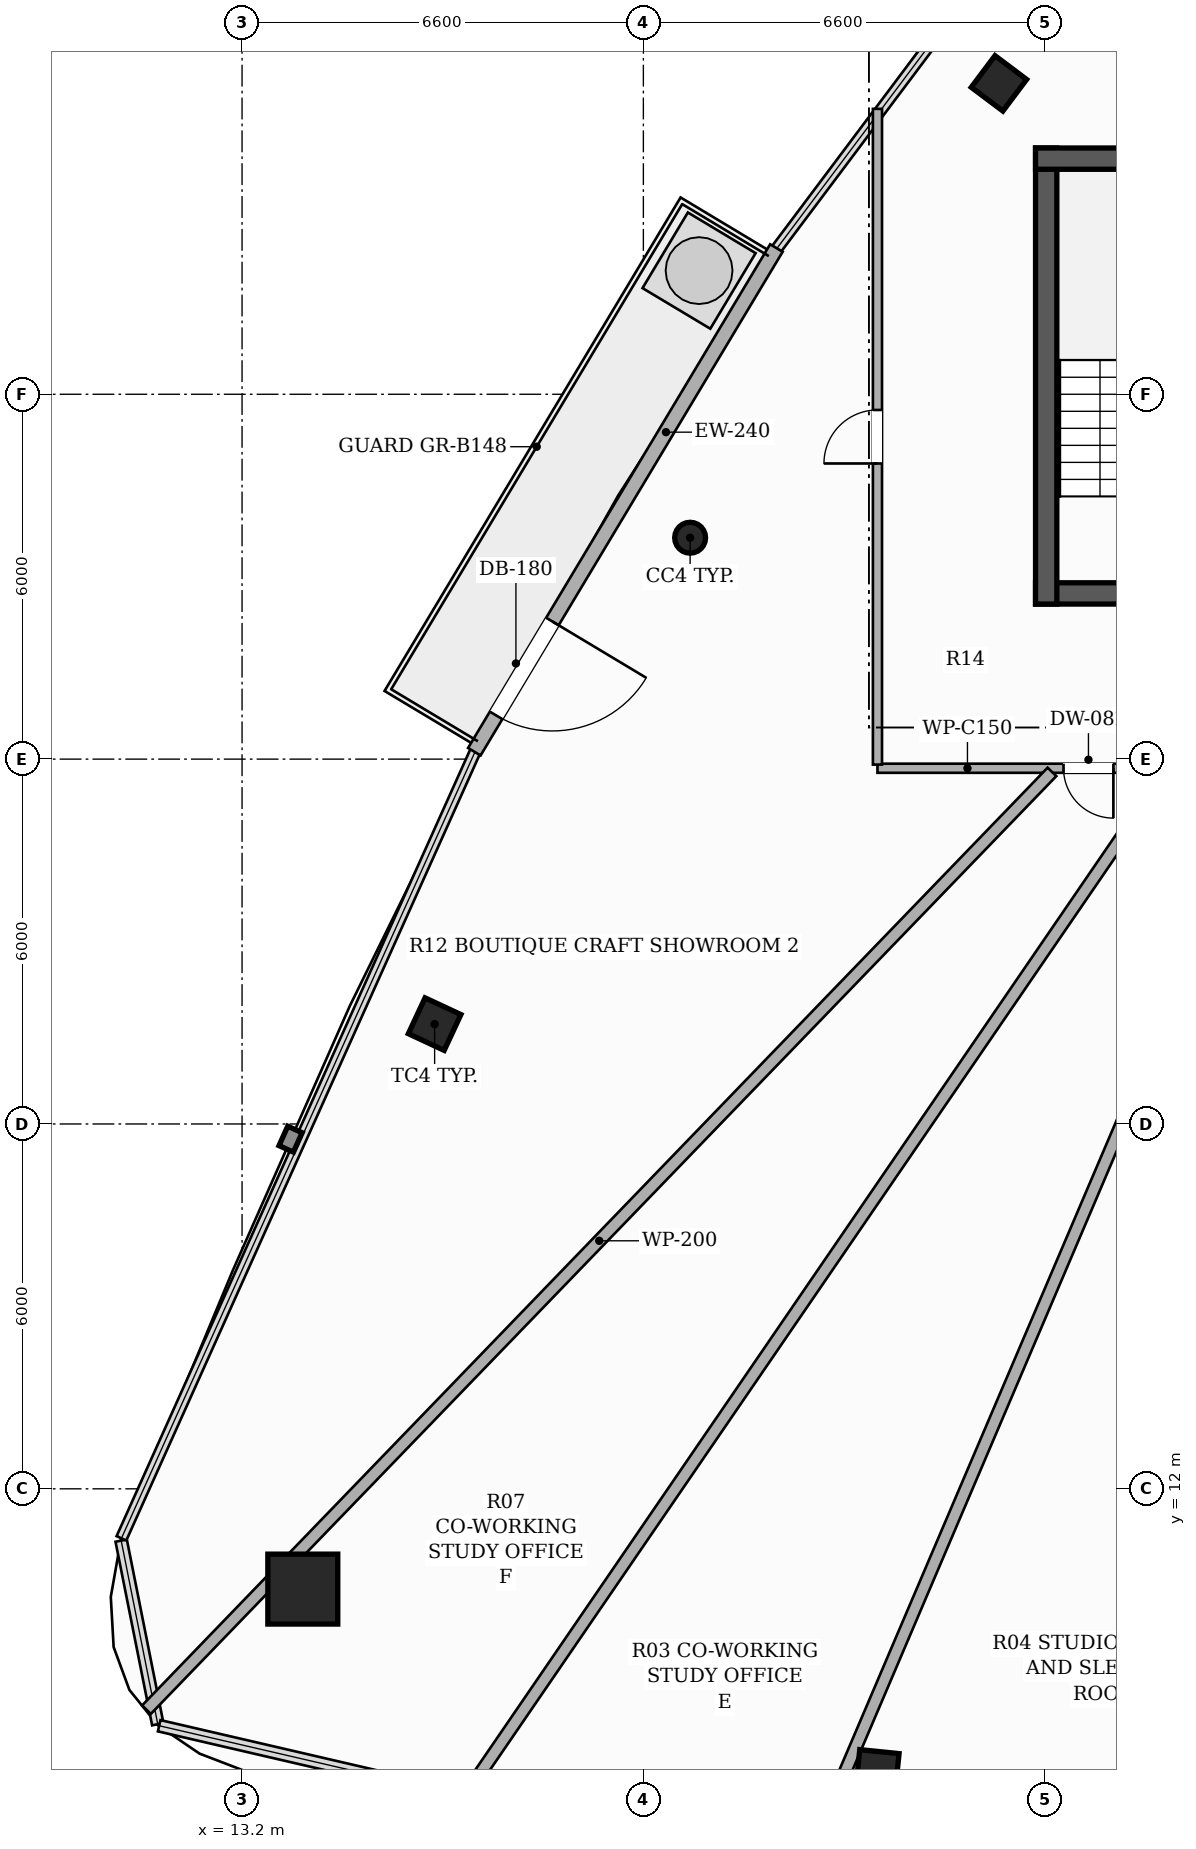
"""IFC4 building model, lengths in metres.
Left out: names, types, materials, properties, quantities, classifications, styles, units other than length and angle.
Written with IfcOpenShell. Run it as: python <this file> out.ifc"""

import sys

from ifc_helpers import new_model, si_unit, direction, frame, frame_2d, origin, origin_2d, place, context, subcontext, project, spatial, rectangle, hollow_rectangle, hollow_circle, extrude, element, fill, save


model = new_model("IFC4")
c1 = context("Model", 3, precision=1e-05, world=origin(), true_north=direction((0.0, 1.0)))
c2 = subcontext(c1, "Body", "Model", "MODEL_VIEW")
j1 = project(units=[si_unit("LENGTHUNIT", "METRE"), si_unit("PLANEANGLEUNIT", "RADIAN")], contexts=[c1])
p1 = place(None, origin())
s1 = spatial("IfcSite", under=j1, at=p1, CompositionType="ELEMENT")
p2 = place(p1, origin())
s2 = spatial("IfcBuilding", under=s1, at=p2, CompositionType="ELEMENT")
p3 = place(p2, frame((0.0, 0.0, 263.45)))
s3 = spatial("IfcBuildingStorey", under=s2, at=p3, CompositionType="ELEMENT", Elevation=263.45)
p4 = place(p3, frame((26.25, 26.725, 0.0), z_axis=(0.0, 0.0, 1.0), x_axis=(1.0, 0.0, 0.0)))
e1 = element("IfcWall", 1, at=p4, inside=s3, PredefinedType="SHEAR", context=c2, shape_type="SweptSolid", body=[
    extrude(rectangle(XDim=13.5, YDim=0.35, at=frame_2d((6.75, 0.0))), origin(), (0.0, 0.0, 1.0), 3.3),
])
p5 = place(p4, frame((4.35, 0.0, 0.0)))
e2 = element("IfcOpeningElement", 2, at=p5, cuts=e1, PredefinedType="OPENING", context=c2, shape_type="SweptSolid", body=[
    extrude(rectangle(XDim=1.05, YDim=2.15, at=frame_2d((0.525, 1.075))), frame((0.0, 0.185, 0.0), z_axis=(0.0, -1.0, 0.0), x_axis=(1.0, 0.0, 0.0)), (0.0, 0.0, 1.0), 0.37),
])
p6 = place(p4, frame((8.3, 0.0, 0.0)))
e3 = element("IfcOpeningElement", 3, at=p6, cuts=e1, PredefinedType="OPENING", context=c2, shape_type="SweptSolid", body=[
    extrude(rectangle(XDim=1.05, YDim=2.15, at=frame_2d((0.525, 1.075))), frame((0.0, 0.185, 0.0), z_axis=(0.0, -1.0, 0.0), x_axis=(1.0, 0.0, 0.0)), (0.0, 0.0, 1.0), 0.37),
])
p7 = place(p3, frame((26.425, 26.55, 0.0), z_axis=(0.0, 0.0, 1.0), x_axis=(0.0, 1.0, 0.0)))
e4 = element("IfcWall", 4, at=p7, inside=s3, PredefinedType="SHEAR", context=c2, shape_type="SweptSolid", body=[
    extrude(rectangle(XDim=7.5, YDim=0.35, at=frame_2d((3.75, 0.0))), origin(), (0.0, 0.0, 1.0), 3.3),
])
p8 = place(p3, frame((26.25, 33.875, 0.0), z_axis=(0.0, 0.0, 1.0), x_axis=(1.0, 0.0, 0.0)))
e5 = element("IfcWall", 5, at=p8, inside=s3, PredefinedType="SHEAR", context=c2, shape_type="SweptSolid", body=[
    extrude(rectangle(XDim=3.6, YDim=0.35, at=frame_2d((1.8, 0.0))), origin(), (0.0, 0.0, 1.0), 3.3),
])
p9 = place(p3, frame((14.199, 10.351, 0.0), z_axis=(0.0, 0.0, 1.0), x_axis=(1.0, 0.0, 0.0)))
e6 = element("IfcColumn", 6, at=p9, inside=s3, PredefinedType="COLUMN", context=c2, shape_type="SweptSolid", body=[
    extrude(hollow_rectangle(XDim=1.15, YDim=1.15, WallThickness=0.036, at=origin_2d()), origin(), (0.0, 0.0, 1.0), 3.3),
])
p10 = place(p3, frame((25.648, 35.113, 0.0), z_axis=(0.0, 0.0, 1.0), x_axis=(0.600420225326, 0.799684658487, 0.0)))
e7 = element("IfcColumn", 7, at=p10, inside=s3, PredefinedType="COLUMN", context=c2, shape_type="SweptSolid", body=[
    extrude(hollow_rectangle(XDim=0.65, YDim=0.65, WallThickness=0.022, at=origin_2d()), origin(), (0.0, 0.0, 1.0), 3.3),
])
p11 = place(p3, frame((20.569, 27.641, 0.0), z_axis=(0.0, 0.0, 1.0), x_axis=(1.0, 0.0, 0.0)))
e8 = element("IfcColumn", 8, at=p11, inside=s3, PredefinedType="COLUMN", context=c2, shape_type="SweptSolid", body=[
    extrude(hollow_circle(Radius=0.254, WallThickness=0.016, at=origin_2d()), origin(), (0.0, 0.0, 1.0), 3.3),
])
for number, where, z_axis, x_axis in (
    (9, (16.367, 19.642, 0.0), (0.0, 0.0, 1.0), (0.423, 0.906, 0.0)),
    (10, (23.649, 7.355, 0.0), (0.0, 0.0, 1.0), (-0.995, 0.101, 0.0)),
):
    element("IfcColumn", number, at=place(p3, frame(where, z_axis=z_axis, x_axis=x_axis)), inside=s3, PredefinedType="COLUMN", context=c2, shape_type="SweptSolid", body=[
        extrude(hollow_rectangle(XDim=0.65, YDim=0.65, WallThickness=0.022, at=origin_2d()), origin(), (0.0, 0.0, 1.0), 3.3),
    ])
p12 = place(p3, frame((21.988, 32.405, 0.0), z_axis=(0.0, 0.0, 1.0), x_axis=(-0.514361929684, -0.857573206958, 0.0)))
e11 = element("IfcWall", 11, at=p12, inside=s3, PredefinedType="SOLIDWALL", context=c2, shape_type="SweptSolid", body=[
    extrude(rectangle(XDim=9.659, YDim=0.24, at=frame_2d((4.829, 0.0))), origin(), (0.0, 0.0, 1.0), 2.624),
])
p13 = place(p12, frame((7.162, 0.0, 0.0)))
e12 = element("IfcOpeningElement", 12, at=p13, cuts=e11, PredefinedType="OPENING", context=c2, shape_type="SweptSolid", body=[
    extrude(rectangle(XDim=1.8, YDim=2.2, at=frame_2d((0.9, 1.1))), frame((0.0, 0.13, 0.0), z_axis=(0.0, -1.0, 0.0), x_axis=(1.0, 0.0, 0.0)), (0.0, 0.0, 1.0), 0.26),
])
p14 = place(p3, frame((32.168, 23.85, 0.0), z_axis=(0.0, 0.0, 1.0), x_axis=(-1.0, 0.0, 0.0)))
e13 = element("IfcWall", 13, at=p14, inside=s3, PredefinedType="PARTITIONING", context=c2, shape_type="SweptSolid", body=[
    extrude(rectangle(XDim=8.518, YDim=0.15, at=frame_2d((4.259, 0.0))), origin(), (0.0, 0.0, 1.0), 2.565),
])
p15 = place(p14, frame((0.894, 0.0, 0.0)))
e14 = element("IfcOpeningElement", 14, at=p15, cuts=e13, PredefinedType="OPENING", context=c2, shape_type="SweptSolid", body=[
    extrude(rectangle(XDim=0.92, YDim=2.15, at=frame_2d((0.46, 1.075))), frame((0.0, 0.085, 0.0), z_axis=(0.0, -1.0, 0.0), x_axis=(1.0, 0.0, 0.0)), (0.0, 0.0, 1.0), 0.17),
])
p16 = place(p14, frame((2.683, 0.0, 0.0)))
e15 = element("IfcOpeningElement", 15, at=p16, cuts=e13, PredefinedType="OPENING", context=c2, shape_type="SweptSolid", body=[
    extrude(rectangle(XDim=0.88, YDim=2.1, at=frame_2d((0.44, 1.05))), frame((0.0, 0.085, 0.0), z_axis=(0.0, -1.0, 0.0), x_axis=(1.0, 0.0, 0.0)), (0.0, 0.0, 1.0), 0.17),
])
p17 = place(p14, frame((4.638, 0.0, 0.0)))
e16 = element("IfcOpeningElement", 16, at=p17, cuts=e13, PredefinedType="OPENING", context=c2, shape_type="SweptSolid", body=[
    extrude(rectangle(XDim=0.82, YDim=2.1, at=frame_2d((0.41, 1.05))), frame((0.0, 0.085, 0.0), z_axis=(0.0, -1.0, 0.0), x_axis=(1.0, 0.0, 0.0)), (0.0, 0.0, 1.0), 0.17),
])
p18 = place(p3, frame((23.65, 23.91, 0.0), z_axis=(0.0, 0.0, 1.0), x_axis=(0.0, 1.0, 0.0)))
e17 = element("IfcWall", 17, at=p18, inside=s3, PredefinedType="PARTITIONING", context=c2, shape_type="SweptSolid", body=[
    extrude(rectangle(XDim=10.784, YDim=0.15, at=frame_2d((5.392, 0.0))), origin(), (0.0, 0.0, 1.0), 2.492),
])
p19 = place(p18, frame((4.952, 0.0, 0.0)))
e18 = element("IfcOpeningElement", 18, at=p19, cuts=e17, PredefinedType="OPENING", context=c2, shape_type="SweptSolid", body=[
    extrude(rectangle(XDim=0.88, YDim=2.1, at=frame_2d((0.44, 1.05))), frame((0.0, 0.085, 0.0), z_axis=(0.0, -1.0, 0.0), x_axis=(1.0, 0.0, 0.0)), (0.0, 0.0, 1.0), 0.17),
])
p20 = place(p3, frame((26.52, 23.79, 0.0), z_axis=(0.0, 0.0, 1.0), x_axis=(-0.694637190704, -0.719360252788, 0.0)))
e19 = element("IfcWall", 19, at=p20, inside=s3, PredefinedType="PARTITIONING", context=c2, shape_type="SweptSolid", body=[
    extrude(rectangle(XDim=21.439, YDim=0.2, at=frame_2d((10.719, 0.0))), origin(), (0.0, 0.0, 1.0), 2.492),
])
p21 = place(p3, frame((22.589, 6.104, 0.0), z_axis=(0.0, 0.0, 1.0), x_axis=(0.392518309842, 0.919744190761, 0.0)))
e20 = element("IfcWall", 20, at=p21, inside=s3, PredefinedType="PARTITIONING", context=c2, shape_type="SweptSolid", body=[
    extrude(rectangle(XDim=19.229, YDim=0.2, at=frame_2d((9.615, 0.0))), origin(), (0.0, 0.0, 1.0), 2.492),
])
p22 = place(p3, frame((16.784, 6.834, 0.0), z_axis=(0.0, 0.0, 1.0), x_axis=(0.565235631435, 0.824929500598, 0.0)))
e21 = element("IfcWall", 21, at=p22, inside=s3, PredefinedType="PARTITIONING", context=c2, shape_type="SweptSolid", body=[
    extrude(rectangle(XDim=20.554, YDim=0.2, at=frame_2d((10.277, 0.0))), origin(), (0.0, 0.0, 1.0), 2.492),
])
p23 = place(p13, origin())
e22 = element("IfcDoor", 22, at=p23, inside=s3, OperationType="SINGLE_SWING_LEFT", PredefinedType="DOOR", context=c2, shape_type="SweptSolid", body=[
    extrude(rectangle(XDim=1.8, YDim=2.2, at=frame_2d((0.9, 1.1))), frame((0.0, 0.025, 0.0), z_axis=(0.0, -1.0, 0.0), x_axis=(1.0, 0.0, 0.0)), (0.0, 0.0, 1.0), 0.05),
])
fill(e12, e22)
p24 = place(p19, origin())
e23 = element("IfcDoor", 23, at=p24, inside=s3, OperationType="SINGLE_SWING_LEFT", PredefinedType="DOOR", context=c2, shape_type="SweptSolid", body=[
    extrude(rectangle(XDim=0.88, YDim=2.1, at=frame_2d((0.44, 1.05))), frame((0.0, 0.025, 0.0), z_axis=(0.0, -1.0, 0.0), x_axis=(1.0, 0.0, 0.0)), (0.0, 0.0, 1.0), 0.05),
])
fill(e18, e23)
p25 = place(p17, origin())
e24 = element("IfcDoor", 24, at=p25, inside=s3, OperationType="SINGLE_SWING_LEFT", PredefinedType="DOOR", context=c2, shape_type="SweptSolid", body=[
    extrude(rectangle(XDim=0.82, YDim=2.1, at=frame_2d((0.41, 1.05))), frame((0.0, 0.025, 0.0), z_axis=(0.0, -1.0, 0.0), x_axis=(1.0, 0.0, 0.0)), (0.0, 0.0, 1.0), 0.05),
])
fill(e16, e24)
save(model, sys.argv[1])
